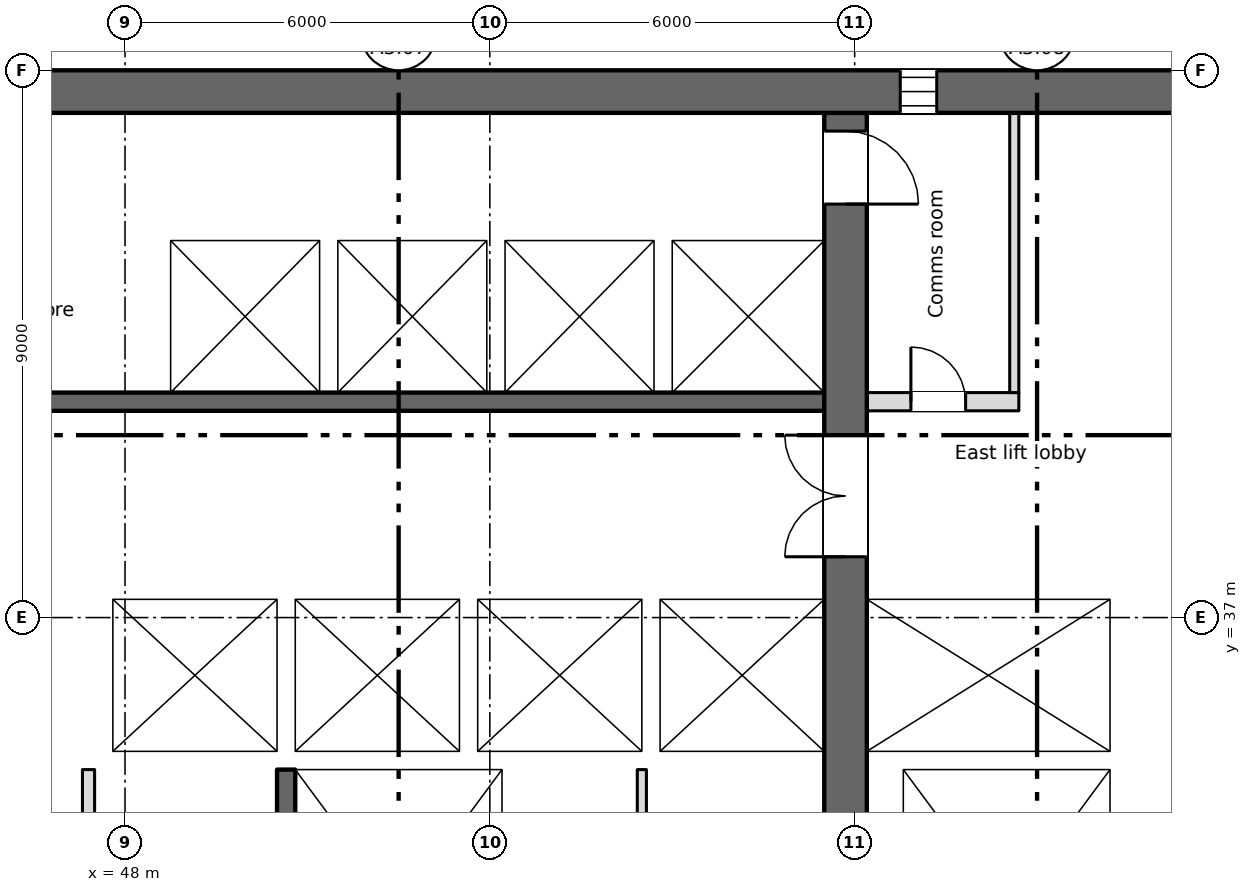
"""IFC4 building model, lengths in metres.
Left out: names, types, materials, properties, quantities, classifications, styles, units other than length and angle.
Written with IfcOpenShell. Run it as: python <this file> out.ifc"""

import sys

from ifc_helpers import new_model, si_unit, direction, frame, frame_2d, origin, place, context, subcontext, project, spatial, rectangle, extrude, element, fill, save


model = new_model("IFC4")
c1 = context("Model", 3, precision=1e-05, world=origin(), true_north=direction((0.0, 1.0)))
c2 = subcontext(c1, "Body", "Model", "MODEL_VIEW")
j1 = project(units=[si_unit("LENGTHUNIT", "METRE"), si_unit("PLANEANGLEUNIT", "RADIAN")], contexts=[c1])
p1 = place(None, origin())
s1 = spatial("IfcSite", under=j1, at=p1, CompositionType="ELEMENT")
p2 = place(p1, origin())
s2 = spatial("IfcBuilding", under=s1, at=p2, CompositionType="ELEMENT")
p3 = place(p2, frame((0.0, 0.0, 181.75)))
s3 = spatial("IfcBuildingStorey", under=s2, at=p3, CompositionType="ELEMENT", Elevation=181.75)
p4 = place(p3, frame((11.55, 45.65, 0.0), z_axis=(0.0, 0.0, 1.0), x_axis=(1.0, 0.0, 0.0)))
e1 = element("IfcWall", 1, at=p4, inside=s3, PredefinedType="SHEAR", context=c2, shape_type="SweptSolid", body=[
    extrude(rectangle(XDim=54.9, YDim=0.7, at=frame_2d((27.45, 0.0))), origin(), (0.0, 0.0, 1.0), 3.35),
])
p5 = place(p4, frame((1.2, 0.0, 0.6)))
e2 = element("IfcOpeningElement", 2, at=p5, cuts=e1, PredefinedType="OPENING", context=c2, shape_type="SweptSolid", body=[
    extrude(rectangle(XDim=0.6, YDim=2.4, at=frame_2d((0.3, 1.2))), frame((0.0, 0.36, 0.0), z_axis=(0.0, -1.0, 0.0), x_axis=(1.0, 0.0, 0.0)), (0.0, 0.0, 1.0), 0.72),
])
p6 = place(p4, frame((49.2, 0.0, 0.6)))
e3 = element("IfcOpeningElement", 3, at=p6, cuts=e1, PredefinedType="OPENING", context=c2, shape_type="SweptSolid", body=[
    extrude(rectangle(XDim=0.6, YDim=2.4, at=frame_2d((0.3, 1.2))), frame((0.0, 0.36, 0.0), z_axis=(0.0, -1.0, 0.0), x_axis=(1.0, 0.0, 0.0)), (0.0, 0.0, 1.0), 0.72),
])
p7 = place(p3, frame((64.35, 34.8, 0.0), z_axis=(0.0, 0.0, 1.0), x_axis=(0.0, 1.0, 0.0)))
e4 = element("IfcWall", 4, at=p7, inside=s3, PredefinedType="SHEAR", context=c2, shape_type="SweptSolid", body=[
    extrude(rectangle(XDim=10.5, YDim=0.3, at=frame_2d((5.25, 0.0))), origin(), (0.0, 0.0, 1.0), 3.35),
])
p8 = place(p3, frame((59.85, 28.4, 0.0), z_axis=(0.0, 0.0, 1.0), x_axis=(0.0, 1.0, 0.0)))
e5 = element("IfcWall", 5, at=p8, inside=s3, PredefinedType="SHEAR", context=c2, shape_type="SweptSolid", body=[
    extrude(rectangle(XDim=16.9, YDim=0.7, at=frame_2d((8.45, 0.0))), origin(), (0.0, 0.0, 1.0), 3.35),
])
p9 = place(p8, frame((9.6, 0.0, 0.0)))
e6 = element("IfcOpeningElement", 6, at=p9, cuts=e5, PredefinedType="OPENING", context=c2, shape_type="SweptSolid", body=[
    extrude(rectangle(XDim=2.0, YDim=2.1, at=frame_2d((1.0, 1.05))), frame((0.0, 0.36, 0.0), z_axis=(0.0, -1.0, 0.0), x_axis=(1.0, 0.0, 0.0)), (0.0, 0.0, 1.0), 0.72),
])
p10 = place(p8, frame((15.4, 0.0, 0.0)))
e7 = element("IfcOpeningElement", 7, at=p10, cuts=e5, PredefinedType="OPENING", context=c2, shape_type="SweptSolid", body=[
    extrude(rectangle(XDim=1.2, YDim=2.1, at=frame_2d((0.6, 1.05))), frame((0.0, 0.36, 0.0), z_axis=(0.0, -1.0, 0.0), x_axis=(1.0, 0.0, 0.0)), (0.0, 0.0, 1.0), 0.72),
])
p11 = place(p3, frame((50.65, 34.5, 0.0), z_axis=(0.0, 0.0, 1.0), x_axis=(0.0, -1.0, 0.0)))
e8 = element("IfcWall", 8, at=p11, inside=s3, PredefinedType="SHEAR", context=c2, shape_type="SweptSolid", body=[
    extrude(rectangle(XDim=6.1, YDim=0.3, at=frame_2d((3.05, 0.0))), origin(), (0.0, 0.0, 1.0), 3.35),
])
p12 = place(p11, frame((4.95, 0.0, 0.0)))
e9 = element("IfcOpeningElement", 9, at=p12, cuts=e8, PredefinedType="OPENING", context=c2, shape_type="SweptSolid", body=[
    extrude(rectangle(XDim=1.1, YDim=2.1, at=frame_2d((0.55, 1.05))), frame((0.0, 0.16, 0.0), z_axis=(0.0, -1.0, 0.0), x_axis=(1.0, 0.0, 0.0)), (0.0, 0.0, 1.0), 0.32),
])
p13 = place(p3, frame((54.35, 28.4, 0.0), z_axis=(0.0, 0.0, 1.0), x_axis=(0.0, 1.0, 0.0)))
e10 = element("IfcWall", 10, at=p13, inside=s3, PredefinedType="SHEAR", context=c2, shape_type="SweptSolid", body=[
    extrude(rectangle(XDim=6.1, YDim=0.3, at=frame_2d((3.05, 0.0))), origin(), (0.0, 0.0, 1.0), 3.35),
])
p14 = place(p3, frame((60.5, 28.4, 0.0), z_axis=(0.0, 0.0, 1.0), x_axis=(0.0, 1.0, 0.0)))
e11 = element("IfcWall", 11, at=p14, inside=s3, PredefinedType="SHEAR", context=c2, shape_type="SweptSolid", body=[
    extrude(rectangle(XDim=6.1, YDim=0.6, at=frame_2d((3.05, 0.0))), origin(), (0.0, 0.0, 1.0), 3.35),
])
p15 = place(p3, frame((64.35, 28.4, 0.0), z_axis=(0.0, 0.0, 1.0), x_axis=(0.0, 1.0, 0.0)))
e12 = element("IfcWall", 12, at=p15, inside=s3, PredefinedType="SHEAR", context=c2, shape_type="SweptSolid", body=[
    extrude(rectangle(XDim=6.1, YDim=0.3, at=frame_2d((3.05, 0.0))), origin(), (0.0, 0.0, 1.0), 3.35),
])
p16 = place(p3, frame((47.3, 34.65, 0.0), z_axis=(0.0, 0.0, 1.0), x_axis=(1.0, 0.0, 0.0)))
e13 = element("IfcWall", 13, at=p16, inside=s3, PredefinedType="SHEAR", context=c2, shape_type="SweptSolid", body=[
    extrude(rectangle(XDim=12.2, YDim=0.3, at=frame_2d((6.1, 0.0))), origin(), (0.0, 0.0, 1.0), 3.35),
])
p17 = place(p16, frame((1.3, 0.0, 0.0)))
e14 = element("IfcOpeningElement", 14, at=p17, cuts=e13, PredefinedType="OPENING", context=c2, shape_type="SweptSolid", body=[
    extrude(rectangle(XDim=1.1, YDim=2.1, at=frame_2d((0.55, 1.05))), frame((0.0, 0.16, 0.0), z_axis=(0.0, -1.0, 0.0), x_axis=(1.0, 0.0, 0.0)), (0.0, 0.0, 1.0), 0.32),
])
p18 = place(p3, frame((60.2, 34.65, 0.0), z_axis=(0.0, 0.0, 1.0), x_axis=(1.0, 0.0, 0.0)))
e15 = element("IfcWall", 15, at=p18, inside=s3, PredefinedType="SHEAR", context=c2, shape_type="SweptSolid", body=[
    extrude(rectangle(XDim=4.3, YDim=0.3, at=frame_2d((2.15, 0.0))), origin(), (0.0, 0.0, 1.0), 3.35),
])
p19 = place(p3, frame((47.3, 37.45, 0.0), z_axis=(0.0, 0.0, 1.0), x_axis=(1.0, 0.0, 0.0)))
e16 = element("IfcWall", 16, at=p19, inside=s3, PredefinedType="SHEAR", context=c2, shape_type="SweptSolid", body=[
    extrude(rectangle(XDim=12.2, YDim=0.3, at=frame_2d((6.1, 0.0))), origin(), (0.0, 0.0, 1.0), 3.35),
])
p20 = place(p19, frame((4.3, 0.0, 0.0)))
e17 = element("IfcOpeningElement", 17, at=p20, cuts=e16, PredefinedType="OPENING", context=c2, shape_type="SweptSolid", body=[
    extrude(rectangle(XDim=1.1, YDim=2.1, at=frame_2d((0.55, 1.05))), frame((0.0, 0.16, 0.0), z_axis=(0.0, -1.0, 0.0), x_axis=(1.0, 0.0, 0.0)), (0.0, 0.0, 1.0), 0.32),
])
p21 = place(p19, frame((7.3, 0.0, 0.0)))
e18 = element("IfcOpeningElement", 18, at=p21, cuts=e16, PredefinedType="OPENING", context=c2, shape_type="SweptSolid", body=[
    extrude(rectangle(XDim=1.1, YDim=2.1, at=frame_2d((0.55, 1.05))), frame((0.0, 0.16, 0.0), z_axis=(0.0, -1.0, 0.0), x_axis=(1.0, 0.0, 0.0)), (0.0, 0.0, 1.0), 0.32),
])
p22 = place(p19, frame((10.3, 0.0, 0.0)))
e19 = element("IfcOpeningElement", 19, at=p22, cuts=e16, PredefinedType="OPENING", context=c2, shape_type="SweptSolid", body=[
    extrude(rectangle(XDim=1.1, YDim=2.1, at=frame_2d((0.55, 1.05))), frame((0.0, 0.16, 0.0), z_axis=(0.0, -1.0, 0.0), x_axis=(1.0, 0.0, 0.0)), (0.0, 0.0, 1.0), 0.32),
])
p23 = place(p3, frame((60.2, 37.45, 0.0), z_axis=(0.0, 0.0, 1.0), x_axis=(1.0, 0.0, 0.0)))
e20 = element("IfcWall", 20, at=p23, inside=s3, PredefinedType="SHEAR", context=c2, shape_type="SweptSolid", body=[
    extrude(rectangle(XDim=4.0, YDim=0.3, at=frame_2d((2.0, 0.0))), origin(), (0.0, 0.0, 1.0), 3.35),
])
p24 = place(p23, frame((1.45, 0.0, 0.0)))
e21 = element("IfcOpeningElement", 21, at=p24, cuts=e20, PredefinedType="OPENING", context=c2, shape_type="SweptSolid", body=[
    extrude(rectangle(XDim=1.1, YDim=2.1, at=frame_2d((0.55, 1.05))), frame((0.0, 0.16, 0.0), z_axis=(0.0, -1.0, 0.0), x_axis=(1.0, 0.0, 0.0)), (0.0, 0.0, 1.0), 0.32),
])
p25 = place(p3, frame((47.55, 34.8, 0.0), z_axis=(0.0, 0.0, 1.0), x_axis=(0.0, 1.0, 0.0)))
e22 = element("IfcWall", 22, at=p25, inside=s3, PredefinedType="SHEAR", context=c2, shape_type="SweptSolid", body=[
    extrude(rectangle(XDim=2.5, YDim=0.5, at=frame_2d((1.25, 0.0))), origin(), (0.0, 0.0, 1.0), 3.35),
])
p26 = place(p3, frame((50.65, 34.8, 0.0), z_axis=(0.0, 0.0, 1.0), x_axis=(0.0, 1.0, 0.0)))
e23 = element("IfcWall", 23, at=p26, inside=s3, PredefinedType="SHEAR", context=c2, shape_type="SweptSolid", body=[
    extrude(rectangle(XDim=2.5, YDim=0.3, at=frame_2d((1.25, 0.0))), origin(), (0.0, 0.0, 1.0), 3.35),
])
p27 = place(p3, frame((18.5, 40.55, 0.0), z_axis=(0.0, 0.0, 1.0), x_axis=(1.0, 0.0, 0.0)))
e24 = element("IfcWall", 24, at=p27, inside=s3, PredefinedType="SHEAR", context=c2, shape_type="SweptSolid", body=[
    extrude(rectangle(XDim=41.0, YDim=0.3, at=frame_2d((20.5, 0.0))), origin(), (0.0, 0.0, 1.0), 3.35),
])
p28 = place(p27, frame((2.15, 0.0, 0.0)))
e25 = element("IfcOpeningElement", 25, at=p28, cuts=e24, PredefinedType="OPENING", context=c2, shape_type="SweptSolid", body=[
    extrude(rectangle(XDim=0.9, YDim=2.1, at=frame_2d((0.45, 1.05))), frame((0.0, 0.16, 0.0), z_axis=(0.0, -1.0, 0.0), x_axis=(1.0, 0.0, 0.0)), (0.0, 0.0, 1.0), 0.32),
])
p29 = place(p27, frame((15.9, 0.0, 0.0)))
e26 = element("IfcOpeningElement", 26, at=p29, cuts=e24, PredefinedType="OPENING", context=c2, shape_type="SweptSolid", body=[
    extrude(rectangle(XDim=0.9, YDim=2.1, at=frame_2d((0.45, 1.05))), frame((0.0, 0.16, 0.0), z_axis=(0.0, -1.0, 0.0), x_axis=(1.0, 0.0, 0.0)), (0.0, 0.0, 1.0), 0.32),
])
p30 = place(p27, frame((21.4, 0.0, 0.0)))
e27 = element("IfcOpeningElement", 27, at=p30, cuts=e24, PredefinedType="OPENING", context=c2, shape_type="SweptSolid", body=[
    extrude(rectangle(XDim=0.9, YDim=2.1, at=frame_2d((0.45, 1.05))), frame((0.0, 0.16, 0.0), z_axis=(0.0, -1.0, 0.0), x_axis=(1.0, 0.0, 0.0)), (0.0, 0.0, 1.0), 0.32),
])
p31 = place(p27, frame((26.9, 0.0, 0.0)))
e28 = element("IfcOpeningElement", 28, at=p31, cuts=e24, PredefinedType="OPENING", context=c2, shape_type="SweptSolid", body=[
    extrude(rectangle(XDim=0.9, YDim=2.1, at=frame_2d((0.45, 1.05))), frame((0.0, 0.16, 0.0), z_axis=(0.0, -1.0, 0.0), x_axis=(1.0, 0.0, 0.0)), (0.0, 0.0, 1.0), 0.32),
])
p32 = place(p27, frame((6.175, 0.0, 0.0)))
e29 = element("IfcOpeningElement", 29, at=p32, cuts=e24, PredefinedType="OPENING", context=c2, shape_type="SweptSolid", body=[
    extrude(rectangle(XDim=1.1, YDim=2.1, at=frame_2d((0.55, 1.05))), frame((0.0, 0.16, 0.0), z_axis=(0.0, -1.0, 0.0), x_axis=(1.0, 0.0, 0.0)), (0.0, 0.0, 1.0), 0.32),
])
p33 = place(p27, frame((8.925, 0.0, 0.0)))
e30 = element("IfcOpeningElement", 30, at=p33, cuts=e24, PredefinedType="OPENING", context=c2, shape_type="SweptSolid", body=[
    extrude(rectangle(XDim=1.1, YDim=2.1, at=frame_2d((0.55, 1.05))), frame((0.0, 0.16, 0.0), z_axis=(0.0, -1.0, 0.0), x_axis=(1.0, 0.0, 0.0)), (0.0, 0.0, 1.0), 0.32),
])
p34 = place(p27, frame((11.675, 0.0, 0.0)))
e31 = element("IfcOpeningElement", 31, at=p34, cuts=e24, PredefinedType="OPENING", context=c2, shape_type="SweptSolid", body=[
    extrude(rectangle(XDim=1.1, YDim=2.1, at=frame_2d((0.55, 1.05))), frame((0.0, 0.16, 0.0), z_axis=(0.0, -1.0, 0.0), x_axis=(1.0, 0.0, 0.0)), (0.0, 0.0, 1.0), 0.32),
])
p35 = place(p27, frame((30.925, 0.0, 0.0)))
e32 = element("IfcOpeningElement", 32, at=p35, cuts=e24, PredefinedType="OPENING", context=c2, shape_type="SweptSolid", body=[
    extrude(rectangle(XDim=1.1, YDim=2.1, at=frame_2d((0.55, 1.05))), frame((0.0, 0.16, 0.0), z_axis=(0.0, -1.0, 0.0), x_axis=(1.0, 0.0, 0.0)), (0.0, 0.0, 1.0), 0.32),
])
p36 = place(p27, frame((33.675, 0.0, 0.0)))
e33 = element("IfcOpeningElement", 33, at=p36, cuts=e24, PredefinedType="OPENING", context=c2, shape_type="SweptSolid", body=[
    extrude(rectangle(XDim=1.1, YDim=2.1, at=frame_2d((0.55, 1.05))), frame((0.0, 0.16, 0.0), z_axis=(0.0, -1.0, 0.0), x_axis=(1.0, 0.0, 0.0)), (0.0, 0.0, 1.0), 0.32),
])
p37 = place(p27, frame((36.375, 0.0, 0.0)))
e34 = element("IfcOpeningElement", 34, at=p37, cuts=e24, PredefinedType="OPENING", context=c2, shape_type="SweptSolid", body=[
    extrude(rectangle(XDim=1.2, YDim=2.1, at=frame_2d((0.6, 1.05))), frame((0.0, 0.16, 0.0), z_axis=(0.0, -1.0, 0.0), x_axis=(1.0, 0.0, 0.0)), (0.0, 0.0, 1.0), 0.32),
])
p38 = place(p27, frame((39.15, 0.0, 0.0)))
e35 = element("IfcOpeningElement", 35, at=p38, cuts=e24, PredefinedType="OPENING", context=c2, shape_type="SweptSolid", body=[
    extrude(rectangle(XDim=1.2, YDim=2.1, at=frame_2d((0.6, 1.05))), frame((0.0, 0.16, 0.0), z_axis=(0.0, -1.0, 0.0), x_axis=(1.0, 0.0, 0.0)), (0.0, 0.0, 1.0), 0.32),
])
p39 = place(p3, frame((18.5, 43.35, 0.0), z_axis=(0.0, 0.0, 1.0), x_axis=(1.0, 0.0, 0.0)))
e36 = element("IfcWall", 36, at=p39, inside=s3, PredefinedType="SHEAR", context=c2, shape_type="SweptSolid", body=[
    extrude(rectangle(XDim=41.0, YDim=0.3, at=frame_2d((20.5, 0.0))), origin(), (0.0, 0.0, 1.0), 3.35),
])
p40 = place(p3, frame((60.2, 40.55, 0.0), z_axis=(0.0, 0.0, 1.0), x_axis=(1.0, 0.0, 0.0)))
e37 = element("IfcWall", 37, at=p40, inside=s3, PredefinedType="PARTITIONING", context=c2, shape_type="SweptSolid", body=[
    extrude(rectangle(XDim=2.5, YDim=0.3, at=frame_2d((1.25, 0.0))), origin(), (0.0, 0.0, 1.0), 3.35),
])
p41 = place(p40, frame((0.725, 0.0, 0.0)))
e38 = element("IfcOpeningElement", 38, at=p41, cuts=e37, PredefinedType="OPENING", context=c2, shape_type="SweptSolid", body=[
    extrude(rectangle(XDim=0.9, YDim=2.1, at=frame_2d((0.45, 1.05))), frame((0.0, 0.16, 0.0), z_axis=(0.0, -1.0, 0.0), x_axis=(1.0, 0.0, 0.0)), (0.0, 0.0, 1.0), 0.32),
])
for number, where, z_axis, x_axis in (
    (39, (53.65, 34.8, 0.0), (0.0, 0.0, 1.0), (0.0, 1.0, 0.0)),
    (40, (56.65, 34.8, 0.0), (0.0, 0.0, 1.0), (0.0, 1.0, 0.0)),
    (41, (48.6, 40.7, 0.0), (0.0, 0.0, 1.0), (0.0, 1.0, 0.0)),
    (42, (51.35, 40.7, 0.0), (0.0, 0.0, 1.0), (0.0, 1.0, 0.0)),
    (43, (54.1, 40.7, 0.0), (0.0, 0.0, 1.0), (0.0, 1.0, 0.0)),
    (44, (56.85, 40.7, 0.0), (0.0, 0.0, 1.0), (0.0, 1.0, 0.0)),
):
    element("IfcWall", number, at=place(p3, frame(where, z_axis=z_axis, x_axis=x_axis)), inside=s3, PredefinedType="SHEAR", context=c2, shape_type="SweptSolid", body=[
        extrude(rectangle(XDim=2.5, YDim=0.3, at=frame_2d((1.25, 0.0))), origin(), (0.0, 0.0, 1.0), 3.35),
    ])
p42 = place(p3, frame((47.4, 28.4, 0.0), z_axis=(0.0, 0.0, 1.0), x_axis=(0.0, 1.0, 0.0)))
e45 = element("IfcWall", 45, at=p42, inside=s3, PredefinedType="PARTITIONING", context=c2, shape_type="SweptSolid", body=[
    extrude(rectangle(XDim=6.1, YDim=0.2, at=frame_2d((3.05, 0.0))), origin(), (0.0, 0.0, 1.0), 3.35),
])
p43 = place(p3, frame((62.625, 40.7, 0.0), z_axis=(0.0, 0.0, 1.0), x_axis=(0.0, 1.0, 0.0)))
e46 = element("IfcWall", 46, at=p43, inside=s3, PredefinedType="PARTITIONING", context=c2, shape_type="SweptSolid", body=[
    extrude(rectangle(XDim=4.6, YDim=0.15, at=frame_2d((2.3, 0.0))), origin(), (0.0, 0.0, 1.0), 3.35),
])
p44 = place(p3, frame((56.5, 28.4, 0.0), z_axis=(0.0, 0.0, 1.0), x_axis=(0.0, 1.0, 0.0)))
e47 = element("IfcWall", 47, at=p44, inside=s3, PredefinedType="PARTITIONING", context=c2, shape_type="SweptSolid", body=[
    extrude(rectangle(XDim=6.1, YDim=0.15, at=frame_2d((3.05, 0.0))), origin(), (0.0, 0.0, 1.0), 3.35),
])
p45 = place(p6, origin())
e48 = element("IfcWindow", 48, at=p45, inside=s3, PartitioningType="SINGLE_PANEL", PredefinedType="WINDOW", context=c2, shape_type="SweptSolid", body=[
    extrude(rectangle(XDim=0.6, YDim=2.4, at=frame_2d((0.3, 1.2))), frame((0.0, 0.03, 0.0), z_axis=(0.0, -1.0, 0.0), x_axis=(1.0, 0.0, 0.0)), (0.0, 0.0, 1.0), 0.06),
])
fill(e3, e48)
p46 = place(p41, origin())
e49 = element("IfcDoor", 49, at=p46, inside=s3, OperationType="SINGLE_SWING_LEFT", PredefinedType="DOOR", context=c2, shape_type="SweptSolid", body=[
    extrude(rectangle(XDim=0.9, YDim=2.1, at=frame_2d((0.45, 1.05))), frame((0.0, 0.025, 0.0), z_axis=(0.0, -1.0, 0.0), x_axis=(1.0, 0.0, 0.0)), (0.0, 0.0, 1.0), 0.05),
])
fill(e38, e49)
p47 = place(p20, origin())
e50 = element("IfcDoor", 50, at=p47, inside=s3, OperationType="SLIDING_TO_LEFT", PredefinedType="DOOR", context=c2, shape_type="SweptSolid", body=[
    extrude(rectangle(XDim=1.1, YDim=2.1, at=frame_2d((0.55, 1.05))), frame((0.0, 0.025, 0.0), z_axis=(0.0, -1.0, 0.0), x_axis=(1.0, 0.0, 0.0)), (0.0, 0.0, 1.0), 0.05),
])
fill(e17, e50)
p48 = place(p21, origin())
e51 = element("IfcDoor", 51, at=p48, inside=s3, OperationType="SLIDING_TO_LEFT", PredefinedType="DOOR", context=c2, shape_type="SweptSolid", body=[
    extrude(rectangle(XDim=1.1, YDim=2.1, at=frame_2d((0.55, 1.05))), frame((0.0, 0.025, 0.0), z_axis=(0.0, -1.0, 0.0), x_axis=(1.0, 0.0, 0.0)), (0.0, 0.0, 1.0), 0.05),
])
fill(e18, e51)
p49 = place(p22, origin())
e52 = element("IfcDoor", 52, at=p49, inside=s3, OperationType="SLIDING_TO_LEFT", PredefinedType="DOOR", context=c2, shape_type="SweptSolid", body=[
    extrude(rectangle(XDim=1.1, YDim=2.1, at=frame_2d((0.55, 1.05))), frame((0.0, 0.025, 0.0), z_axis=(0.0, -1.0, 0.0), x_axis=(1.0, 0.0, 0.0)), (0.0, 0.0, 1.0), 0.05),
])
fill(e19, e52)
p50 = place(p35, origin())
e53 = element("IfcDoor", 53, at=p50, inside=s3, OperationType="SLIDING_TO_LEFT", PredefinedType="DOOR", context=c2, shape_type="SweptSolid", body=[
    extrude(rectangle(XDim=1.1, YDim=2.1, at=frame_2d((0.55, 1.05))), frame((0.0, 0.025, 0.0), z_axis=(0.0, -1.0, 0.0), x_axis=(1.0, 0.0, 0.0)), (0.0, 0.0, 1.0), 0.05),
])
fill(e32, e53)
p51 = place(p36, origin())
e54 = element("IfcDoor", 54, at=p51, inside=s3, OperationType="SLIDING_TO_LEFT", PredefinedType="DOOR", context=c2, shape_type="SweptSolid", body=[
    extrude(rectangle(XDim=1.1, YDim=2.1, at=frame_2d((0.55, 1.05))), frame((0.0, 0.025, 0.0), z_axis=(0.0, -1.0, 0.0), x_axis=(1.0, 0.0, 0.0)), (0.0, 0.0, 1.0), 0.05),
])
fill(e33, e54)
p52 = place(p37, origin())
e55 = element("IfcDoor", 55, at=p52, inside=s3, OperationType="SLIDING_TO_LEFT", PredefinedType="DOOR", context=c2, shape_type="SweptSolid", body=[
    extrude(rectangle(XDim=1.2, YDim=2.1, at=frame_2d((0.6, 1.05))), frame((0.0, 0.025, 0.0), z_axis=(0.0, -1.0, 0.0), x_axis=(1.0, 0.0, 0.0)), (0.0, 0.0, 1.0), 0.05),
])
fill(e34, e55)
p53 = place(p38, origin())
e56 = element("IfcDoor", 56, at=p53, inside=s3, OperationType="SLIDING_TO_LEFT", PredefinedType="DOOR", context=c2, shape_type="SweptSolid", body=[
    extrude(rectangle(XDim=1.2, YDim=2.1, at=frame_2d((0.6, 1.05))), frame((0.0, 0.025, 0.0), z_axis=(0.0, -1.0, 0.0), x_axis=(1.0, 0.0, 0.0)), (0.0, 0.0, 1.0), 0.05),
])
fill(e35, e56)
p54 = place(p24, origin())
e57 = element("IfcDoor", 57, at=p54, inside=s3, OperationType="SLIDING_TO_LEFT", PredefinedType="DOOR", context=c2, shape_type="SweptSolid", body=[
    extrude(rectangle(XDim=1.1, YDim=2.1, at=frame_2d((0.55, 1.05))), frame((0.0, 0.025, 0.0), z_axis=(0.0, -1.0, 0.0), x_axis=(1.0, 0.0, 0.0)), (0.0, 0.0, 1.0), 0.05),
])
fill(e21, e57)
p55 = place(p17, origin())
e58 = element("IfcDoor", 58, at=p55, inside=s3, OperationType="SLIDING_TO_LEFT", PredefinedType="DOOR", context=c2, shape_type="SweptSolid", body=[
    extrude(rectangle(XDim=1.1, YDim=2.1, at=frame_2d((0.55, 1.05))), frame((0.0, 0.025, 0.0), z_axis=(0.0, -1.0, 0.0), x_axis=(1.0, 0.0, 0.0)), (0.0, 0.0, 1.0), 0.05),
])
fill(e14, e58)
p56 = place(p9, origin())
e59 = element("IfcDoor", 59, at=p56, inside=s3, OperationType="DOUBLE_DOOR_SINGLE_SWING", PredefinedType="DOOR", context=c2, shape_type="SweptSolid", body=[
    extrude(rectangle(XDim=2.0, YDim=2.1, at=frame_2d((1.0, 1.05))), frame((0.0, 0.025, 0.0), z_axis=(0.0, -1.0, 0.0), x_axis=(1.0, 0.0, 0.0)), (0.0, 0.0, 1.0), 0.05),
])
fill(e6, e59)
p57 = place(p10, origin())
e60 = element("IfcDoor", 60, at=p57, inside=s3, OperationType="SINGLE_SWING_LEFT", PredefinedType="DOOR", context=c2, shape_type="SweptSolid", body=[
    extrude(rectangle(XDim=1.2, YDim=2.1, at=frame_2d((0.6, 1.05))), frame((0.0, 0.025, 0.0), z_axis=(0.0, -1.0, 0.0), x_axis=(1.0, 0.0, 0.0)), (0.0, 0.0, 1.0), 0.05),
])
fill(e7, e60)
save(model, sys.argv[1])
